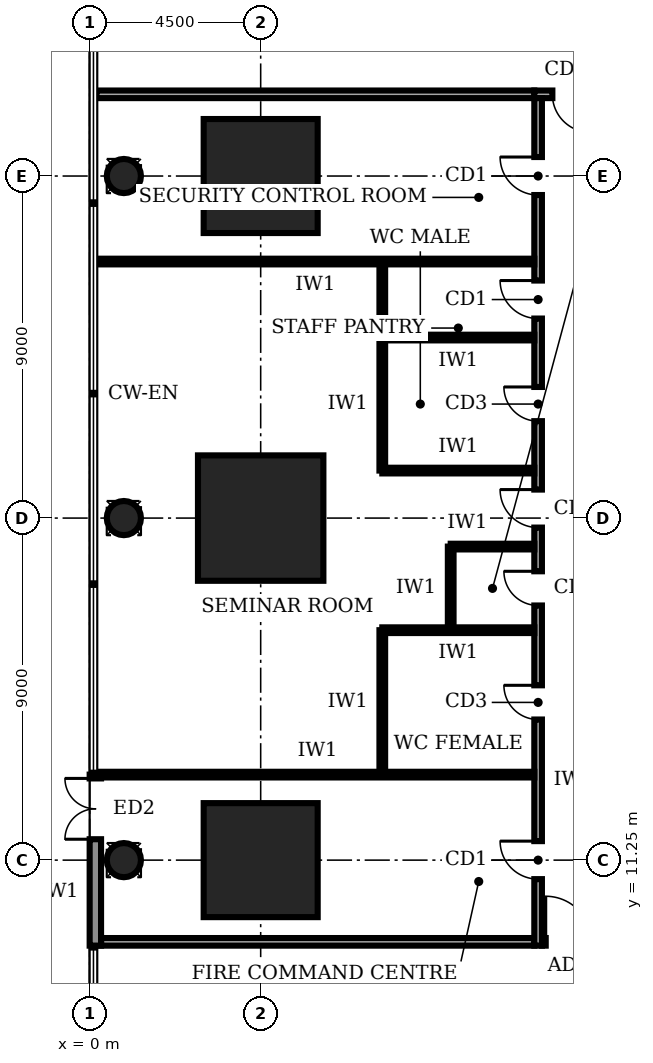
"""IFC4 building model, lengths in metres.
Left out: names, types, materials, properties, quantities, classifications, styles, units other than length and angle.
Written with IfcOpenShell. Run it as: python <this file> out.ifc"""

import sys

from ifc_helpers import new_model, si_unit, direction, frame, frame_2d, origin, origin_2d, place, context, subcontext, project, spatial, rectangle, circle, extrude, element, fill, save


model = new_model("IFC4")
c1 = context("Model", 3, precision=1e-05, world=origin(), true_north=direction((0.0, 1.0)))
c2 = subcontext(c1, "Body", "Model", "MODEL_VIEW")
j1 = project(units=[si_unit("LENGTHUNIT", "METRE"), si_unit("PLANEANGLEUNIT", "RADIAN")], contexts=[c1])
p1 = place(None, origin())
s1 = spatial("IfcSite", under=j1, at=p1, CompositionType="ELEMENT")
p2 = place(p1, origin())
s2 = spatial("IfcBuilding", under=s1, at=p2, CompositionType="ELEMENT")
p3 = place(p2, origin())
s3 = spatial("IfcBuildingStorey", under=s2, at=p3, CompositionType="ELEMENT", Elevation=0.0)
p4 = place(p3, frame((4.5, 11.25, -0.4), z_axis=(0.0, 0.0, 1.0), x_axis=(1.0, 0.0, 0.0)))
e1 = element("IfcColumn", 1, at=p4, inside=s3, PredefinedType="COLUMN", context=c2, shape_type="SweptSolid", body=[
    extrude(rectangle(XDim=3.0, YDim=3.0, at=origin_2d()), origin(), (0.0, 0.0, 1.0), 6.4),
])
p5 = place(p3, frame((4.5, 20.25, -0.4), z_axis=(0.0, 0.0, 1.0), x_axis=(1.0, 0.0, 0.0)))
e2 = element("IfcColumn", 2, at=p5, inside=s3, PredefinedType="COLUMN", context=c2, shape_type="SweptSolid", body=[
    extrude(rectangle(XDim=3.3, YDim=3.3, at=origin_2d()), origin(), (0.0, 0.0, 1.0), 6.4),
])
p6 = place(p3, frame((4.5, 29.25, -0.4), z_axis=(0.0, 0.0, 1.0), x_axis=(1.0, 0.0, 0.0)))
e3 = element("IfcColumn", 3, at=p6, inside=s3, PredefinedType="COLUMN", context=c2, shape_type="SweptSolid", body=[
    extrude(rectangle(XDim=3.0, YDim=3.0, at=origin_2d()), origin(), (0.0, 0.0, 1.0), 6.4),
])
for number, where, z_axis, x_axis in (
    (4, (0.9, 11.25, -0.4), (0.0, 0.0, 1.0), (1.0, 0.0, 0.0)),
    (5, (0.9, 20.25, -0.4), (0.0, 0.0, 1.0), (1.0, 0.0, 0.0)),
    (6, (0.9, 29.25, -0.4), (0.0, 0.0, 1.0), (1.0, 0.0, 0.0)),
):
    element("IfcColumn", number, at=place(p3, frame(where, z_axis=z_axis, x_axis=x_axis)), inside=s3, PredefinedType="COLUMN", context=c2, shape_type="SweptSolid", body=[
        extrude(circle(Radius=0.45, at=origin_2d()), origin(), (0.0, 0.0, 1.0), 6.4),
    ])
p7 = place(p3, frame((0.15, 13.5, 0.0), z_axis=(0.0, 0.0, 1.0), x_axis=(0.0, -1.0, 0.0)))
e7 = element("IfcWall", 7, at=p7, inside=s3, PredefinedType="STANDARD", context=c2, shape_type="SweptSolid", body=[
    extrude(rectangle(XDim=4.5, YDim=0.3, at=frame_2d((2.25, 0.0))), origin(), (0.0, 0.0, 1.0), 5.7),
])
p8 = place(p7, frame((0.1, 0.0, 0.0)))
e8 = element("IfcOpeningElement", 8, at=p8, cuts=e7, PredefinedType="OPENING", context=c2, shape_type="SweptSolid", body=[
    extrude(rectangle(XDim=1.6, YDim=2.4, at=frame_2d((0.8, 1.2))), frame((0.0, 0.16, 0.0), z_axis=(0.0, -1.0, 0.0), x_axis=(1.0, 0.0, 0.0)), (0.0, 0.0, 1.0), 0.32),
])
p9 = place(p3, frame((11.9, 9.1, 0.0), z_axis=(0.0, 0.0, 1.0), x_axis=(1.0, 0.0, 0.0)))
e9 = element("IfcWall", 9, at=p9, inside=s3, PredefinedType="SOLIDWALL", context=c2, shape_type="SweptSolid", body=[
    extrude(rectangle(XDim=16.9, YDim=0.2, at=frame_2d((8.45, 0.0))), origin(), (0.0, 0.0, 1.0), 5.7),
])
p10 = place(p9, frame((0.1, 0.0, 0.0)))
e10 = element("IfcOpeningElement", 10, at=p10, cuts=e9, PredefinedType="OPENING", context=c2, shape_type="SweptSolid", body=[
    extrude(rectangle(XDim=1.2, YDim=2.4, at=frame_2d((0.6, 1.2))), frame((0.0, 0.11, 0.0), z_axis=(0.0, -1.0, 0.0), x_axis=(1.0, 0.0, 0.0)), (0.0, 0.0, 1.0), 0.22),
])
p11 = place(p9, frame((2.35, 0.0, 0.0)))
e11 = element("IfcOpeningElement", 11, at=p11, cuts=e9, PredefinedType="OPENING", context=c2, shape_type="SweptSolid", body=[
    extrude(rectangle(XDim=2.0, YDim=2.4, at=frame_2d((1.0, 1.2))), frame((0.0, 0.11, 0.0), z_axis=(0.0, -1.0, 0.0), x_axis=(1.0, 0.0, 0.0)), (0.0, 0.0, 1.0), 0.22),
])
p12 = place(p9, frame((12.35, 0.0, 0.0)))
e12 = element("IfcOpeningElement", 12, at=p12, cuts=e9, PredefinedType="OPENING", context=c2, shape_type="SweptSolid", body=[
    extrude(rectangle(XDim=2.0, YDim=2.4, at=frame_2d((1.0, 1.2))), frame((0.0, 0.11, 0.0), z_axis=(0.0, -1.0, 0.0), x_axis=(1.0, 0.0, 0.0)), (0.0, 0.0, 1.0), 0.22),
])
p13 = place(p9, frame((15.425, 0.0, 0.0)))
e13 = element("IfcOpeningElement", 13, at=p13, cuts=e9, PredefinedType="OPENING", context=c2, shape_type="SweptSolid", body=[
    extrude(rectangle(XDim=1.0, YDim=2.1, at=frame_2d((0.5, 1.05))), frame((0.0, 0.11, 0.0), z_axis=(0.0, -1.0, 0.0), x_axis=(1.0, 0.0, 0.0)), (0.0, 0.0, 1.0), 0.22),
])
p14 = place(p3, frame((28.6, 31.4, 0.0), z_axis=(0.0, 0.0, 1.0), x_axis=(-1.0, 0.0, 0.0)))
e14 = element("IfcWall", 14, at=p14, inside=s3, PredefinedType="SOLIDWALL", context=c2, shape_type="SweptSolid", body=[
    extrude(rectangle(XDim=16.9, YDim=0.2, at=frame_2d((8.45, 0.0))), origin(), (0.0, 0.0, 1.0), 5.7),
])
p15 = place(p14, frame((15.425, 0.0, 0.0)))
e15 = element("IfcOpeningElement", 15, at=p15, cuts=e14, PredefinedType="OPENING", context=c2, shape_type="SweptSolid", body=[
    extrude(rectangle(XDim=1.0, YDim=2.1, at=frame_2d((0.5, 1.05))), frame((0.0, 0.11, 0.0), z_axis=(0.0, -1.0, 0.0), x_axis=(1.0, 0.0, 0.0)), (0.0, 0.0, 1.0), 0.22),
])
p16 = place(p14, frame((7.45, 0.0, 0.0)))
e16 = element("IfcOpeningElement", 16, at=p16, cuts=e14, PredefinedType="OPENING", context=c2, shape_type="SweptSolid", body=[
    extrude(rectangle(XDim=1.8, YDim=2.1, at=frame_2d((0.9, 1.05))), frame((0.0, 0.11, 0.0), z_axis=(0.0, -1.0, 0.0), x_axis=(1.0, 0.0, 0.0)), (0.0, 0.0, 1.0), 0.22),
])
p17 = place(p14, frame((0.275, 0.0, 0.0)))
e17 = element("IfcOpeningElement", 17, at=p17, cuts=e14, PredefinedType="OPENING", context=c2, shape_type="SweptSolid", body=[
    extrude(rectangle(XDim=1.0, YDim=2.1, at=frame_2d((0.5, 1.05))), frame((0.0, 0.11, 0.0), z_axis=(0.0, -1.0, 0.0), x_axis=(1.0, 0.0, 0.0)), (0.0, 0.0, 1.0), 0.22),
])
p18 = place(p3, frame((11.8, 31.3, 0.0), z_axis=(0.0, 0.0, 1.0), x_axis=(0.0, -1.0, 0.0)))
e18 = element("IfcWall", 18, at=p18, inside=s3, PredefinedType="SOLIDWALL", context=c2, shape_type="SweptSolid", body=[
    extrude(rectangle(XDim=22.3, YDim=0.2, at=frame_2d((11.15, 0.0))), origin(), (0.0, 0.0, 1.0), 5.7),
])
p19 = place(p18, frame((19.55, 0.0, 0.0)))
e19 = element("IfcOpeningElement", 19, at=p19, cuts=e18, PredefinedType="OPENING", context=c2, shape_type="SweptSolid", body=[
    extrude(rectangle(XDim=1.0, YDim=2.1, at=frame_2d((0.5, 1.05))), frame((0.0, 0.11, 0.0), z_axis=(0.0, -1.0, 0.0), x_axis=(1.0, 0.0, 0.0)), (0.0, 0.0, 1.0), 0.22),
])
p20 = place(p18, frame((15.45, 0.0, 0.0)))
e20 = element("IfcOpeningElement", 20, at=p20, cuts=e18, PredefinedType="OPENING", context=c2, shape_type="SweptSolid", body=[
    extrude(rectangle(XDim=0.9, YDim=2.1, at=frame_2d((0.45, 1.05))), frame((0.0, 0.11, 0.0), z_axis=(0.0, -1.0, 0.0), x_axis=(1.0, 0.0, 0.0)), (0.0, 0.0, 1.0), 0.22),
])
p21 = place(p18, frame((12.45, 0.0, 0.0)))
e21 = element("IfcOpeningElement", 21, at=p21, cuts=e18, PredefinedType="OPENING", context=c2, shape_type="SweptSolid", body=[
    extrude(rectangle(XDim=0.9, YDim=2.1, at=frame_2d((0.45, 1.05))), frame((0.0, 0.11, 0.0), z_axis=(0.0, -1.0, 0.0), x_axis=(1.0, 0.0, 0.0)), (0.0, 0.0, 1.0), 0.22),
])
p22 = place(p18, frame((7.6, 0.0, 0.0)))
e22 = element("IfcOpeningElement", 22, at=p22, cuts=e18, PredefinedType="OPENING", context=c2, shape_type="SweptSolid", body=[
    extrude(rectangle(XDim=0.9, YDim=2.1, at=frame_2d((0.45, 1.05))), frame((0.0, 0.11, 0.0), z_axis=(0.0, -1.0, 0.0), x_axis=(1.0, 0.0, 0.0)), (0.0, 0.0, 1.0), 0.22),
])
p23 = place(p18, frame((4.8, 0.0, 0.0)))
e23 = element("IfcOpeningElement", 23, at=p23, cuts=e18, PredefinedType="OPENING", context=c2, shape_type="SweptSolid", body=[
    extrude(rectangle(XDim=1.0, YDim=2.1, at=frame_2d((0.5, 1.05))), frame((0.0, 0.11, 0.0), z_axis=(0.0, -1.0, 0.0), x_axis=(1.0, 0.0, 0.0)), (0.0, 0.0, 1.0), 0.22),
])
p24 = place(p18, frame((10.3, 0.0, 0.0)))
e24 = element("IfcOpeningElement", 24, at=p24, cuts=e18, PredefinedType="OPENING", context=c2, shape_type="SweptSolid", body=[
    extrude(rectangle(XDim=1.0, YDim=2.1, at=frame_2d((0.5, 1.05))), frame((0.0, 0.11, 0.0), z_axis=(0.0, -1.0, 0.0), x_axis=(1.0, 0.0, 0.0)), (0.0, 0.0, 1.0), 0.22),
])
p25 = place(p18, frame((1.55, 0.0, 0.0)))
e25 = element("IfcOpeningElement", 25, at=p25, cuts=e18, PredefinedType="OPENING", context=c2, shape_type="SweptSolid", body=[
    extrude(rectangle(XDim=1.0, YDim=2.1, at=frame_2d((0.5, 1.05))), frame((0.0, 0.11, 0.0), z_axis=(0.0, -1.0, 0.0), x_axis=(1.0, 0.0, 0.0)), (0.0, 0.0, 1.0), 0.22),
])
p26 = place(p3, frame((0.3, 9.1, 0.0), z_axis=(0.0, 0.0, 1.0), x_axis=(1.0, 0.0, 0.0)))
e26 = element("IfcWall", 26, at=p26, inside=s3, PredefinedType="SOLIDWALL", context=c2, shape_type="SweptSolid", body=[
    extrude(rectangle(XDim=11.4, YDim=0.2, at=frame_2d((5.7, 0.0))), origin(), (0.0, 0.0, 1.0), 5.7),
])
p27 = place(p3, frame((0.18, 31.4, 0.0), z_axis=(0.0, 0.0, 1.0), x_axis=(1.0, 0.0, 0.0)))
e27 = element("IfcWall", 27, at=p27, inside=s3, PredefinedType="SOLIDWALL", context=c2, shape_type="SweptSolid", body=[
    extrude(rectangle(XDim=11.52, YDim=0.2, at=frame_2d((5.76, 0.0))), origin(), (0.0, 0.0, 1.0), 5.7),
])
p28 = place(p3, frame((0.3, 13.5, 0.0), z_axis=(0.0, 0.0, 1.0), x_axis=(1.0, 0.0, 0.0)))
e28 = element("IfcWall", 28, at=p28, inside=s3, PredefinedType="PARTITIONING", context=c2, shape_type="SweptSolid", body=[
    extrude(rectangle(XDim=11.4, YDim=0.15, at=frame_2d((5.7, 0.0))), origin(), (0.0, 0.0, 1.0), 5.7),
])
p29 = place(p3, frame((0.18, 27.0, 0.0), z_axis=(0.0, 0.0, 1.0), x_axis=(1.0, 0.0, 0.0)))
e29 = element("IfcWall", 29, at=p29, inside=s3, PredefinedType="PARTITIONING", context=c2, shape_type="SweptSolid", body=[
    extrude(rectangle(XDim=11.52, YDim=0.15, at=frame_2d((5.76, 0.0))), origin(), (0.0, 0.0, 1.0), 5.7),
])
p30 = place(p3, frame((11.7, 17.3, 0.0), z_axis=(0.0, 0.0, 1.0), x_axis=(-1.0, 0.0, 0.0)))
e30 = element("IfcWall", 30, at=p30, inside=s3, PredefinedType="PARTITIONING", context=c2, shape_type="SweptSolid", body=[
    extrude(rectangle(XDim=4.0, YDim=0.15, at=frame_2d((2.0, 0.0))), origin(), (0.0, 0.0, 1.0), 5.7),
])
p31 = place(p3, frame((11.7, 19.5, 0.0), z_axis=(0.0, 0.0, 1.0), x_axis=(-1.0, 0.0, 0.0)))
e31 = element("IfcWall", 31, at=p31, inside=s3, PredefinedType="PARTITIONING", context=c2, shape_type="SweptSolid", body=[
    extrude(rectangle(XDim=2.2, YDim=0.15, at=frame_2d((1.1, 0.0))), origin(), (0.0, 0.0, 1.0), 5.7),
])
for number, where, z_axis, x_axis in (
    (32, (11.7, 21.5, 0.0), (0.0, 0.0, 1.0), (-1.0, 0.0, 0.0)),
    (33, (11.7, 25.0, 0.0), (0.0, 0.0, 1.0), (-1.0, 0.0, 0.0)),
):
    element("IfcWall", number, at=place(p3, frame(where, z_axis=z_axis, x_axis=x_axis)), inside=s3, PredefinedType="PARTITIONING", context=c2, shape_type="SweptSolid", body=[
        extrude(rectangle(XDim=4.0, YDim=0.15, at=frame_2d((2.0, 0.0))), origin(), (0.0, 0.0, 1.0), 5.7),
    ])
p32 = place(p3, frame((7.7, 13.5, 0.0), z_axis=(0.0, 0.0, 1.0), x_axis=(0.0, 1.0, 0.0)))
e34 = element("IfcWall", 34, at=p32, inside=s3, PredefinedType="PARTITIONING", context=c2, shape_type="SweptSolid", body=[
    extrude(rectangle(XDim=3.8, YDim=0.15, at=frame_2d((1.9, 0.0))), origin(), (0.0, 0.0, 1.0), 5.7),
])
p33 = place(p3, frame((9.5, 17.3, 0.0), z_axis=(0.0, 0.0, 1.0), x_axis=(0.0, 1.0, 0.0)))
e35 = element("IfcWall", 35, at=p33, inside=s3, PredefinedType="PARTITIONING", context=c2, shape_type="SweptSolid", body=[
    extrude(rectangle(XDim=2.2, YDim=0.15, at=frame_2d((1.1, 0.0))), origin(), (0.0, 0.0, 1.0), 5.7),
])
p34 = place(p3, frame((7.7, 21.5, 0.0), z_axis=(0.0, 0.0, 1.0), x_axis=(0.0, 1.0, 0.0)))
e36 = element("IfcWall", 36, at=p34, inside=s3, PredefinedType="PARTITIONING", context=c2, shape_type="SweptSolid", body=[
    extrude(rectangle(XDim=3.5, YDim=0.15, at=frame_2d((1.75, 0.0))), origin(), (0.0, 0.0, 1.0), 5.7),
])
p35 = place(p3, frame((7.7, 25.0, 0.0), z_axis=(0.0, 0.0, 1.0), x_axis=(0.0, 1.0, 0.0)))
e37 = element("IfcWall", 37, at=p35, inside=s3, PredefinedType="PARTITIONING", context=c2, shape_type="SweptSolid", body=[
    extrude(rectangle(XDim=2.0, YDim=0.15, at=frame_2d((1.0, 0.0))), origin(), (0.0, 0.0, 1.0), 5.7),
])
p36 = place(p8, frame((1.6, 0.0, 0.0), z_axis=(0.0, 0.0, 1.0), x_axis=(-1.0, 0.0, 0.0)))
e38 = element("IfcDoor", 38, at=p36, inside=s3, OperationType="DOUBLE_DOOR_SINGLE_SWING", PredefinedType="DOOR", context=c2, shape_type="SweptSolid", body=[
    extrude(rectangle(XDim=1.6, YDim=2.4, at=frame_2d((0.8, 1.2))), frame((0.0, 0.025, 0.0), z_axis=(0.0, -1.0, 0.0), x_axis=(1.0, 0.0, 0.0)), (0.0, 0.0, 1.0), 0.05),
])
fill(e8, e38)
p37 = place(p10, origin())
e39 = element("IfcDoor", 39, at=p37, inside=s3, OperationType="SINGLE_SWING_LEFT", PredefinedType="DOOR", context=c2, shape_type="SweptSolid", body=[
    extrude(rectangle(XDim=1.2, YDim=2.4, at=frame_2d((0.6, 1.2))), frame((0.0, 0.025, 0.0), z_axis=(0.0, -1.0, 0.0), x_axis=(1.0, 0.0, 0.0)), (0.0, 0.0, 1.0), 0.05),
])
fill(e10, e39)
p38 = place(p15, origin())
e40 = element("IfcDoor", 40, at=p38, inside=s3, OperationType="SINGLE_SWING_LEFT", PredefinedType="DOOR", context=c2, shape_type="SweptSolid", body=[
    extrude(rectangle(XDim=1.0, YDim=2.1, at=frame_2d((0.5, 1.05))), frame((0.0, 0.025, 0.0), z_axis=(0.0, -1.0, 0.0), x_axis=(1.0, 0.0, 0.0)), (0.0, 0.0, 1.0), 0.05),
])
fill(e15, e40)
p39 = place(p19, frame((1.0, 0.0, 0.0), z_axis=(0.0, 0.0, 1.0), x_axis=(-1.0, 0.0, 0.0)))
e41 = element("IfcDoor", 41, at=p39, inside=s3, OperationType="SINGLE_SWING_RIGHT", PredefinedType="DOOR", context=c2, shape_type="SweptSolid", body=[
    extrude(rectangle(XDim=1.0, YDim=2.1, at=frame_2d((0.5, 1.05))), frame((0.0, 0.025, 0.0), z_axis=(0.0, -1.0, 0.0), x_axis=(1.0, 0.0, 0.0)), (0.0, 0.0, 1.0), 0.05),
])
fill(e19, e41)
p40 = place(p20, frame((0.9, 0.0, 0.0), z_axis=(0.0, 0.0, 1.0), x_axis=(-1.0, 0.0, 0.0)))
e42 = element("IfcDoor", 42, at=p40, inside=s3, OperationType="SINGLE_SWING_RIGHT", PredefinedType="DOOR", context=c2, shape_type="SweptSolid", body=[
    extrude(rectangle(XDim=0.9, YDim=2.1, at=frame_2d((0.45, 1.05))), frame((0.0, 0.025, 0.0), z_axis=(0.0, -1.0, 0.0), x_axis=(1.0, 0.0, 0.0)), (0.0, 0.0, 1.0), 0.05),
])
fill(e20, e42)
p41 = place(p21, frame((0.9, 0.0, 0.0), z_axis=(0.0, 0.0, 1.0), x_axis=(-1.0, 0.0, 0.0)))
e43 = element("IfcDoor", 43, at=p41, inside=s3, OperationType="SINGLE_SWING_RIGHT", PredefinedType="DOOR", context=c2, shape_type="SweptSolid", body=[
    extrude(rectangle(XDim=0.9, YDim=2.1, at=frame_2d((0.45, 1.05))), frame((0.0, 0.025, 0.0), z_axis=(0.0, -1.0, 0.0), x_axis=(1.0, 0.0, 0.0)), (0.0, 0.0, 1.0), 0.05),
])
fill(e21, e43)
p42 = place(p22, frame((0.9, 0.0, 0.0), z_axis=(0.0, 0.0, 1.0), x_axis=(-1.0, 0.0, 0.0)))
e44 = element("IfcDoor", 44, at=p42, inside=s3, OperationType="SINGLE_SWING_RIGHT", PredefinedType="DOOR", context=c2, shape_type="SweptSolid", body=[
    extrude(rectangle(XDim=0.9, YDim=2.1, at=frame_2d((0.45, 1.05))), frame((0.0, 0.025, 0.0), z_axis=(0.0, -1.0, 0.0), x_axis=(1.0, 0.0, 0.0)), (0.0, 0.0, 1.0), 0.05),
])
fill(e22, e44)
p43 = place(p23, frame((1.0, 0.0, 0.0), z_axis=(0.0, 0.0, 1.0), x_axis=(-1.0, 0.0, 0.0)))
e45 = element("IfcDoor", 45, at=p43, inside=s3, OperationType="SINGLE_SWING_RIGHT", PredefinedType="DOOR", context=c2, shape_type="SweptSolid", body=[
    extrude(rectangle(XDim=1.0, YDim=2.1, at=frame_2d((0.5, 1.05))), frame((0.0, 0.025, 0.0), z_axis=(0.0, -1.0, 0.0), x_axis=(1.0, 0.0, 0.0)), (0.0, 0.0, 1.0), 0.05),
])
fill(e23, e45)
p44 = place(p24, frame((1.0, 0.0, 0.0), z_axis=(0.0, 0.0, 1.0), x_axis=(-1.0, 0.0, 0.0)))
e46 = element("IfcDoor", 46, at=p44, inside=s3, OperationType="SINGLE_SWING_RIGHT", PredefinedType="DOOR", context=c2, shape_type="SweptSolid", body=[
    extrude(rectangle(XDim=1.0, YDim=2.1, at=frame_2d((0.5, 1.05))), frame((0.0, 0.025, 0.0), z_axis=(0.0, -1.0, 0.0), x_axis=(1.0, 0.0, 0.0)), (0.0, 0.0, 1.0), 0.05),
])
fill(e24, e46)
p45 = place(p25, frame((1.0, 0.0, 0.0), z_axis=(0.0, 0.0, 1.0), x_axis=(-1.0, 0.0, 0.0)))
e47 = element("IfcDoor", 47, at=p45, inside=s3, OperationType="SINGLE_SWING_RIGHT", PredefinedType="DOOR", context=c2, shape_type="SweptSolid", body=[
    extrude(rectangle(XDim=1.0, YDim=2.1, at=frame_2d((0.5, 1.05))), frame((0.0, 0.025, 0.0), z_axis=(0.0, -1.0, 0.0), x_axis=(1.0, 0.0, 0.0)), (0.0, 0.0, 1.0), 0.05),
])
fill(e25, e47)
save(model, sys.argv[1])
